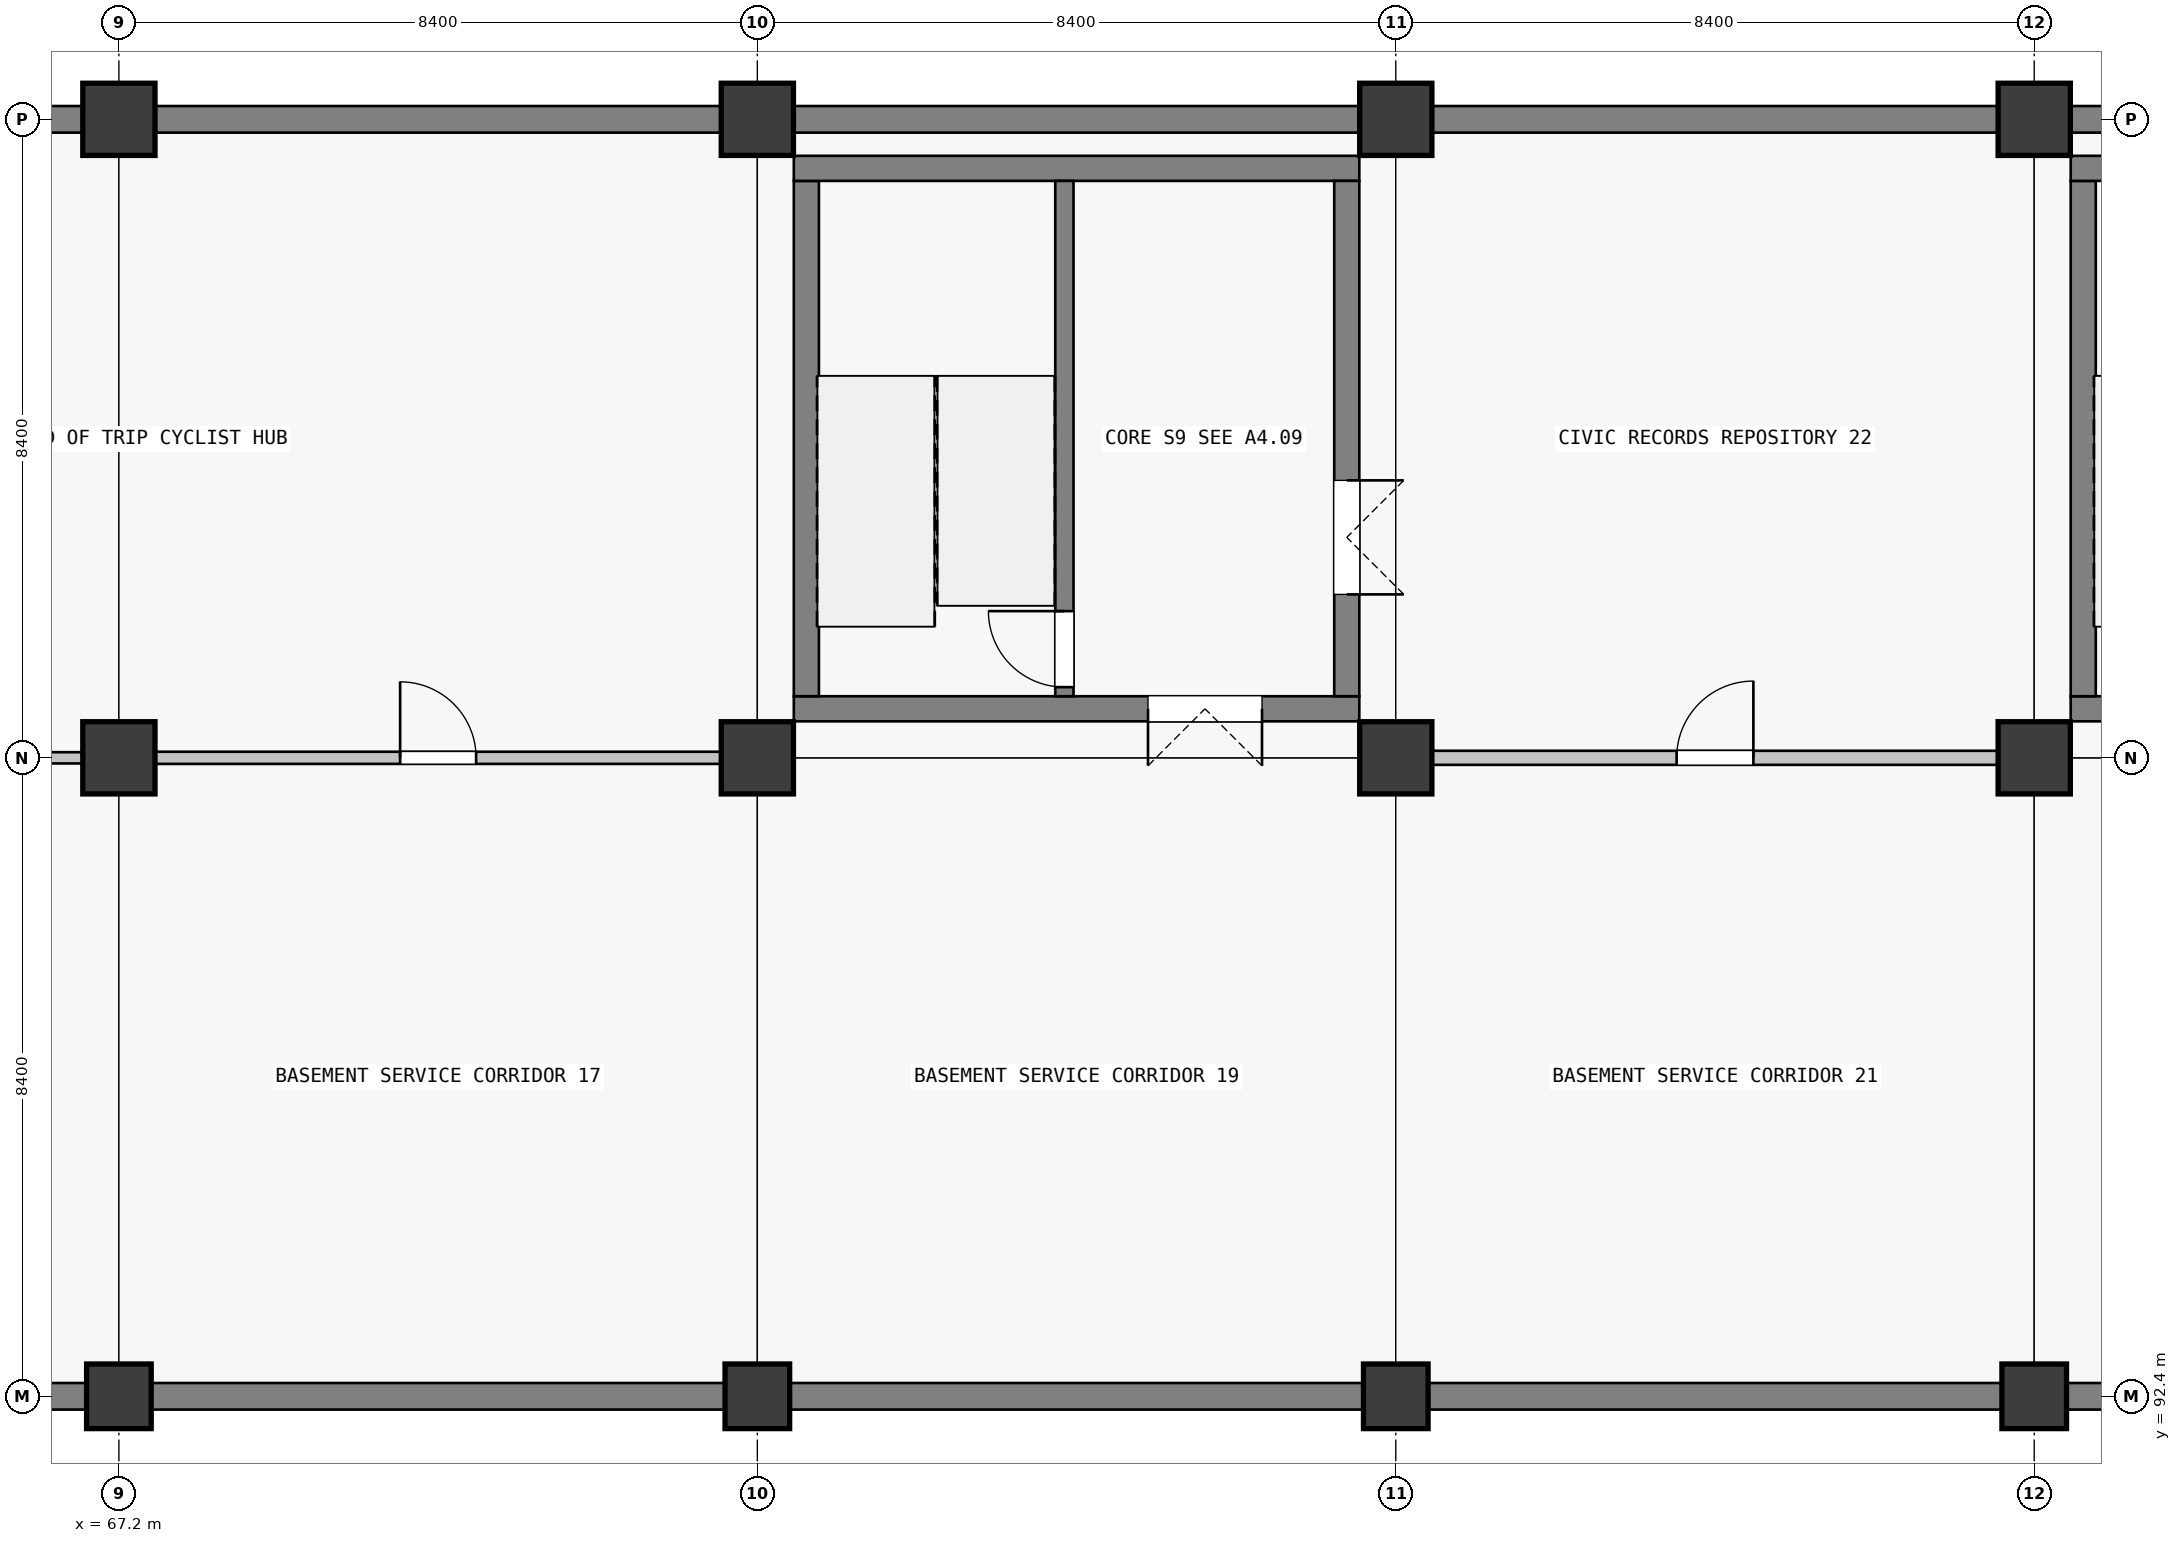
"""IFC4 building model, lengths in metres.
Left out: names, types, materials, properties, quantities, classifications, styles, units other than length and angle.
Written with IfcOpenShell. Run it as: python <this file> out.ifc"""

import sys

from ifc_helpers import new_model, si_unit, direction, frame, frame_2d, origin, origin_2d, place, context, subcontext, project, spatial, rectangle, extrude, element, fill, save


model = new_model("IFC4")
c1 = context("Model", 3, precision=1e-05, world=origin(), true_north=direction((0.0, 1.0)))
c2 = subcontext(c1, "Body", "Model", "MODEL_VIEW")
j1 = project(units=[si_unit("LENGTHUNIT", "METRE"), si_unit("PLANEANGLEUNIT", "RADIAN")], contexts=[c1])
p1 = place(None, origin())
s1 = spatial("IfcSite", under=j1, at=p1, CompositionType="ELEMENT")
p2 = place(p1, origin())
s2 = spatial("IfcBuilding", under=s1, at=p2, CompositionType="ELEMENT")
p3 = place(p2, frame((0.0, 0.0, -4.5)))
s3 = spatial("IfcBuildingStorey", under=s2, at=p3, CompositionType="ELEMENT", Elevation=-4.5)
p4 = place(p3, frame((67.2, 92.4, -0.35), z_axis=(0.0, 0.0, 1.0), x_axis=(1.0, 0.0, 0.0)))
e1 = element("IfcColumn", 1, at=p4, inside=s3, PredefinedType="COLUMN", context=c2, shape_type="SweptSolid", body=[
    extrude(rectangle(XDim=0.85, YDim=0.85, at=origin_2d()), origin(), (0.0, 0.0, 1.0), 4.5),
])
for number, where, z_axis, x_axis in (
    (2, (67.2, 100.8, -0.35), (0.0, 0.0, 1.0), (1.0, 0.0, 0.0)),
    (3, (67.2, 109.2, -0.35), (0.0, 0.0, 1.0), (1.0, 0.0, 0.0)),
):
    element("IfcColumn", number, at=place(p3, frame(where, z_axis=z_axis, x_axis=x_axis)), inside=s3, PredefinedType="COLUMN", context=c2, shape_type="SweptSolid", body=[
        extrude(rectangle(XDim=0.95, YDim=0.95, at=origin_2d()), origin(), (0.0, 0.0, 1.0), 4.85),
    ])
p5 = place(p3, frame((75.6, 92.4, -0.35), z_axis=(0.0, 0.0, 1.0), x_axis=(1.0, 0.0, 0.0)))
e4 = element("IfcColumn", 4, at=p5, inside=s3, PredefinedType="COLUMN", context=c2, shape_type="SweptSolid", body=[
    extrude(rectangle(XDim=0.85, YDim=0.85, at=origin_2d()), origin(), (0.0, 0.0, 1.0), 4.5),
])
for number, where, z_axis, x_axis in (
    (5, (75.6, 100.8, -0.35), (0.0, 0.0, 1.0), (1.0, 0.0, 0.0)),
    (6, (75.6, 109.2, -0.35), (0.0, 0.0, 1.0), (1.0, 0.0, 0.0)),
):
    element("IfcColumn", number, at=place(p3, frame(where, z_axis=z_axis, x_axis=x_axis)), inside=s3, PredefinedType="COLUMN", context=c2, shape_type="SweptSolid", body=[
        extrude(rectangle(XDim=0.95, YDim=0.95, at=origin_2d()), origin(), (0.0, 0.0, 1.0), 4.85),
    ])
p6 = place(p3, frame((84.0, 92.4, -0.35), z_axis=(0.0, 0.0, 1.0), x_axis=(1.0, 0.0, 0.0)))
e7 = element("IfcColumn", 7, at=p6, inside=s3, PredefinedType="COLUMN", context=c2, shape_type="SweptSolid", body=[
    extrude(rectangle(XDim=0.85, YDim=0.85, at=origin_2d()), origin(), (0.0, 0.0, 1.0), 4.5),
])
for number, where, z_axis, x_axis in (
    (8, (84.0, 100.8, -0.35), (0.0, 0.0, 1.0), (1.0, 0.0, 0.0)),
    (9, (84.0, 109.2, -0.35), (0.0, 0.0, 1.0), (1.0, 0.0, 0.0)),
):
    element("IfcColumn", number, at=place(p3, frame(where, z_axis=z_axis, x_axis=x_axis)), inside=s3, PredefinedType="COLUMN", context=c2, shape_type="SweptSolid", body=[
        extrude(rectangle(XDim=0.95, YDim=0.95, at=origin_2d()), origin(), (0.0, 0.0, 1.0), 4.85),
    ])
p7 = place(p3, frame((92.4, 92.4, -0.35), z_axis=(0.0, 0.0, 1.0), x_axis=(1.0, 0.0, 0.0)))
e10 = element("IfcColumn", 10, at=p7, inside=s3, PredefinedType="COLUMN", context=c2, shape_type="SweptSolid", body=[
    extrude(rectangle(XDim=0.85, YDim=0.85, at=origin_2d()), origin(), (0.0, 0.0, 1.0), 4.5),
])
for number, where, z_axis, x_axis in (
    (11, (92.4, 100.8, -0.35), (0.0, 0.0, 1.0), (1.0, 0.0, 0.0)),
    (12, (92.4, 109.2, -0.35), (0.0, 0.0, 1.0), (1.0, 0.0, 0.0)),
):
    element("IfcColumn", number, at=place(p3, frame(where, z_axis=z_axis, x_axis=x_axis)), inside=s3, PredefinedType="COLUMN", context=c2, shape_type="SweptSolid", body=[
        extrude(rectangle(XDim=0.95, YDim=0.95, at=origin_2d()), origin(), (0.0, 0.0, 1.0), 4.85),
    ])
p8 = place(p3, frame((66.774, 92.4, 0.0), z_axis=(0.0, 0.0, 1.0), x_axis=(-1.0, 0.0, 0.0)))
e13 = element("IfcWall", 13, at=p8, inside=s3, PredefinedType="SOLIDWALL", context=c2, shape_type="SweptSolid", body=[
    extrude(rectangle(XDim=7.498, YDim=0.35, at=frame_2d((3.749, 0.0))), origin(), (0.0, 0.0, 1.0), 3.35),
])
p9 = place(p3, frame((59.276, 109.2, 0.0), z_axis=(0.0, 0.0, 1.0), x_axis=(1.0, 0.0, 0.0)))
e14 = element("IfcWall", 14, at=p9, inside=s3, PredefinedType="SOLIDWALL", context=c2, shape_type="SweptSolid", body=[
    extrude(rectangle(XDim=7.448, YDim=0.35, at=frame_2d((3.724, 0.0))), origin(), (0.0, 0.0, 1.0), 3.35),
])
p10 = place(p3, frame((75.174, 92.4, 0.0), z_axis=(0.0, 0.0, 1.0), x_axis=(-1.0, 0.0, 0.0)))
e15 = element("IfcWall", 15, at=p10, inside=s3, PredefinedType="SOLIDWALL", context=c2, shape_type="SweptSolid", body=[
    extrude(rectangle(XDim=7.548, YDim=0.35, at=frame_2d((3.774, 0.0))), origin(), (0.0, 0.0, 1.0), 3.35),
])
p11 = place(p3, frame((67.676, 109.2, 0.0), z_axis=(0.0, 0.0, 1.0), x_axis=(1.0, 0.0, 0.0)))
e16 = element("IfcWall", 16, at=p11, inside=s3, PredefinedType="SOLIDWALL", context=c2, shape_type="SweptSolid", body=[
    extrude(rectangle(XDim=7.448, YDim=0.35, at=frame_2d((3.724, 0.0))), origin(), (0.0, 0.0, 1.0), 3.35),
])
p12 = place(p3, frame((83.574, 92.4, 0.0), z_axis=(0.0, 0.0, 1.0), x_axis=(-1.0, 0.0, 0.0)))
e17 = element("IfcWall", 17, at=p12, inside=s3, PredefinedType="SOLIDWALL", context=c2, shape_type="SweptSolid", body=[
    extrude(rectangle(XDim=7.548, YDim=0.35, at=frame_2d((3.774, 0.0))), origin(), (0.0, 0.0, 1.0), 3.35),
])
p13 = place(p3, frame((76.076, 109.2, 0.0), z_axis=(0.0, 0.0, 1.0), x_axis=(1.0, 0.0, 0.0)))
e18 = element("IfcWall", 18, at=p13, inside=s3, PredefinedType="SOLIDWALL", context=c2, shape_type="SweptSolid", body=[
    extrude(rectangle(XDim=7.448, YDim=0.35, at=frame_2d((3.724, 0.0))), origin(), (0.0, 0.0, 1.0), 3.35),
])
p14 = place(p3, frame((91.974, 92.4, 0.0), z_axis=(0.0, 0.0, 1.0), x_axis=(-1.0, 0.0, 0.0)))
e19 = element("IfcWall", 19, at=p14, inside=s3, PredefinedType="SOLIDWALL", context=c2, shape_type="SweptSolid", body=[
    extrude(rectangle(XDim=7.548, YDim=0.35, at=frame_2d((3.774, 0.0))), origin(), (0.0, 0.0, 1.0), 3.35),
])
p15 = place(p3, frame((84.476, 109.2, 0.0), z_axis=(0.0, 0.0, 1.0), x_axis=(1.0, 0.0, 0.0)))
e20 = element("IfcWall", 20, at=p15, inside=s3, PredefinedType="SOLIDWALL", context=c2, shape_type="SweptSolid", body=[
    extrude(rectangle(XDim=7.448, YDim=0.35, at=frame_2d((3.724, 0.0))), origin(), (0.0, 0.0, 1.0), 3.35),
])
p16 = place(p3, frame((100.374, 92.4, 0.0), z_axis=(0.0, 0.0, 1.0), x_axis=(-1.0, 0.0, 0.0)))
e21 = element("IfcWall", 21, at=p16, inside=s3, PredefinedType="SOLIDWALL", context=c2, shape_type="SweptSolid", body=[
    extrude(rectangle(XDim=7.548, YDim=0.35, at=frame_2d((3.774, 0.0))), origin(), (0.0, 0.0, 1.0), 3.35),
])
p17 = place(p3, frame((92.876, 109.2, 0.0), z_axis=(0.0, 0.0, 1.0), x_axis=(1.0, 0.0, 0.0)))
e22 = element("IfcWall", 22, at=p17, inside=s3, PredefinedType="SOLIDWALL", context=c2, shape_type="SweptSolid", body=[
    extrude(rectangle(XDim=7.448, YDim=0.35, at=frame_2d((3.724, 0.0))), origin(), (0.0, 0.0, 1.0), 3.35),
])
p18 = place(p3, frame((83.52, 101.445, -0.35), z_axis=(0.0, 0.0, 1.0), x_axis=(-1.0, 0.0, 0.0)))
e23 = element("IfcWall", 23, at=p18, inside=s3, PredefinedType="SHEAR", context=c2, shape_type="SweptSolid", body=[
    extrude(rectangle(XDim=7.44, YDim=0.33, at=frame_2d((3.72, 0.0))), origin(), (0.0, 0.0, 1.0), 4.85),
])
p19 = place(p18, frame((1.28, 0.0, 0.35)))
e24 = element("IfcOpeningElement", 24, at=p19, cuts=e23, PredefinedType="OPENING", context=c2, shape_type="SweptSolid", body=[
    extrude(rectangle(XDim=1.5, YDim=2.15, at=frame_2d((0.75, 1.075))), frame((0.0, 0.165, 0.0), z_axis=(0.0, -1.0, 0.0), x_axis=(1.0, 0.0, 0.0)), (0.0, 0.0, 1.0), 0.33),
])
p20 = place(p3, frame((76.245, 101.61, -0.35), z_axis=(0.0, 0.0, 1.0), x_axis=(0.0, 1.0, 0.0)))
e25 = element("IfcWall", 25, at=p20, inside=s3, PredefinedType="SHEAR", context=c2, shape_type="SweptSolid", body=[
    extrude(rectangle(XDim=6.78, YDim=0.33, at=frame_2d((3.39, 0.0))), origin(), (0.0, 0.0, 1.0), 4.85),
])
p21 = place(p3, frame((76.08, 108.555, -0.35), z_axis=(0.0, 0.0, 1.0), x_axis=(1.0, 0.0, 0.0)))
e26 = element("IfcWall", 26, at=p21, inside=s3, PredefinedType="SHEAR", context=c2, shape_type="SweptSolid", body=[
    extrude(rectangle(XDim=7.44, YDim=0.33, at=frame_2d((3.72, 0.0))), origin(), (0.0, 0.0, 1.0), 4.85),
])
p22 = place(p3, frame((83.355, 108.39, -0.35), z_axis=(0.0, 0.0, 1.0), x_axis=(0.0, -1.0, 0.0)))
e27 = element("IfcWall", 27, at=p22, inside=s3, PredefinedType="SHEAR", context=c2, shape_type="SweptSolid", body=[
    extrude(rectangle(XDim=6.78, YDim=0.33, at=frame_2d((3.39, 0.0))), origin(), (0.0, 0.0, 1.0), 4.85),
])
p23 = place(p22, frame((3.94, 0.0, 0.35)))
e28 = element("IfcOpeningElement", 28, at=p23, cuts=e27, PredefinedType="OPENING", context=c2, shape_type="SweptSolid", body=[
    extrude(rectangle(XDim=1.5, YDim=2.15, at=frame_2d((0.75, 1.075))), frame((0.0, 0.165, 0.0), z_axis=(0.0, -1.0, 0.0), x_axis=(1.0, 0.0, 0.0)), (0.0, 0.0, 1.0), 0.33),
])
p24 = place(p3, frame((79.64, 101.61, -0.35), z_axis=(0.0, 0.0, 1.0), x_axis=(0.0, 1.0, 0.0)))
e29 = element("IfcWall", 29, at=p24, inside=s3, PredefinedType="SHEAR", context=c2, shape_type="SweptSolid", body=[
    extrude(rectangle(XDim=6.78, YDim=0.24, at=frame_2d((3.39, 0.0))), origin(), (0.0, 0.0, 1.0), 4.85),
])
p25 = place(p24, frame((0.12, 0.0, 0.35)))
e30 = element("IfcOpeningElement", 30, at=p25, cuts=e29, PredefinedType="OPENING", context=c2, shape_type="SweptSolid", body=[
    extrude(rectangle(XDim=1.0, YDim=2.15, at=frame_2d((0.5, 1.075))), frame((0.0, 0.12, 0.0), z_axis=(0.0, -1.0, 0.0), x_axis=(1.0, 0.0, 0.0)), (0.0, 0.0, 1.0), 0.24),
])
p26 = place(p3, frame((100.32, 101.445, -0.35), z_axis=(0.0, 0.0, 1.0), x_axis=(-1.0, 0.0, 0.0)))
e31 = element("IfcWall", 31, at=p26, inside=s3, PredefinedType="SHEAR", context=c2, shape_type="SweptSolid", body=[
    extrude(rectangle(XDim=7.44, YDim=0.33, at=frame_2d((3.72, 0.0))), origin(), (0.0, 0.0, 1.0), 4.85),
])
p27 = place(p26, frame((1.28, 0.0, 0.35)))
e32 = element("IfcOpeningElement", 32, at=p27, cuts=e31, PredefinedType="OPENING", context=c2, shape_type="SweptSolid", body=[
    extrude(rectangle(XDim=1.5, YDim=2.15, at=frame_2d((0.75, 1.075))), frame((0.0, 0.165, 0.0), z_axis=(0.0, -1.0, 0.0), x_axis=(1.0, 0.0, 0.0)), (0.0, 0.0, 1.0), 0.33),
])
p28 = place(p3, frame((93.045, 101.61, -0.35), z_axis=(0.0, 0.0, 1.0), x_axis=(0.0, 1.0, 0.0)))
e33 = element("IfcWall", 33, at=p28, inside=s3, PredefinedType="SHEAR", context=c2, shape_type="SweptSolid", body=[
    extrude(rectangle(XDim=6.78, YDim=0.33, at=frame_2d((3.39, 0.0))), origin(), (0.0, 0.0, 1.0), 4.85),
])
p29 = place(p3, frame((92.88, 108.555, -0.35), z_axis=(0.0, 0.0, 1.0), x_axis=(1.0, 0.0, 0.0)))
e34 = element("IfcWall", 34, at=p29, inside=s3, PredefinedType="SHEAR", context=c2, shape_type="SweptSolid", body=[
    extrude(rectangle(XDim=7.44, YDim=0.33, at=frame_2d((3.72, 0.0))), origin(), (0.0, 0.0, 1.0), 4.85),
])
p30 = place(p3, frame((59.277, 100.8, 0.0), z_axis=(0.0, 0.0, 1.0), x_axis=(1.0, 0.0, 0.0)))
e35 = element("IfcWall", 35, at=p30, inside=s3, PredefinedType="PARTITIONING", context=c2, shape_type="SweptSolid", body=[
    extrude(rectangle(XDim=7.446, YDim=0.148, at=frame_2d((3.723, 0.0))), origin(), (0.0, 0.0, 1.0), 3.27),
])
p31 = place(p30, frame((3.198, 0.0, 0.0)))
e36 = element("IfcOpeningElement", 36, at=p31, cuts=e35, PredefinedType="OPENING", context=c2, shape_type="SweptSolid", body=[
    extrude(rectangle(XDim=1.05, YDim=2.15, at=frame_2d((0.525, 1.075))), frame((0.0, 0.074, 0.0), z_axis=(0.0, -1.0, 0.0), x_axis=(1.0, 0.0, 0.0)), (0.0, 0.0, 1.0), 0.148),
])
p32 = place(p3, frame((67.677, 100.8, 0.0), z_axis=(0.0, 0.0, 1.0), x_axis=(1.0, 0.0, 0.0)))
e37 = element("IfcWall", 37, at=p32, inside=s3, PredefinedType="PARTITIONING", context=c2, shape_type="SweptSolid", body=[
    extrude(rectangle(XDim=7.446, YDim=0.16, at=frame_2d((3.723, 0.0))), origin(), (0.0, 0.0, 1.0), 3.27),
])
p33 = place(p32, frame((3.223, 0.0, 0.0)))
e38 = element("IfcOpeningElement", 38, at=p33, cuts=e37, PredefinedType="OPENING", context=c2, shape_type="SweptSolid", body=[
    extrude(rectangle(XDim=1.0, YDim=2.15, at=frame_2d((0.5, 1.075))), frame((0.0, 0.08, 0.0), z_axis=(0.0, -1.0, 0.0), x_axis=(1.0, 0.0, 0.0)), (0.0, 0.0, 1.0), 0.16),
])
p34 = place(p3, frame((84.477, 100.8, 0.0), z_axis=(0.0, 0.0, 1.0), x_axis=(1.0, 0.0, 0.0)))
e39 = element("IfcWall", 39, at=p34, inside=s3, PredefinedType="PARTITIONING", context=c2, shape_type="SweptSolid", body=[
    extrude(rectangle(XDim=7.446, YDim=0.185, at=frame_2d((3.723, 0.0))), origin(), (0.0, 0.0, 1.0), 3.27),
])
p35 = place(p34, frame((3.218, 0.0, 0.0)))
e40 = element("IfcOpeningElement", 40, at=p35, cuts=e39, PredefinedType="OPENING", context=c2, shape_type="SweptSolid", body=[
    extrude(rectangle(XDim=1.01, YDim=2.12, at=frame_2d((0.505, 1.06))), frame((0.0, 0.093, 0.0), z_axis=(0.0, -1.0, 0.0), x_axis=(1.0, 0.0, 0.0)), (0.0, 0.0, 1.0), 0.185),
])
p36 = place(p25, origin())
e41 = element("IfcDoor", 41, at=p36, inside=s3, OperationType="SINGLE_SWING_RIGHT", PredefinedType="DOOR", context=c2, shape_type="SweptSolid", body=[
    extrude(rectangle(XDim=1.0, YDim=2.15, at=frame_2d((0.5, 1.075))), frame((0.0, 0.025, 0.0), z_axis=(0.0, -1.0, 0.0), x_axis=(1.0, 0.0, 0.0)), (0.0, 0.0, 1.0), 0.05),
])
fill(e30, e41)
p37 = place(p23, origin())
e42 = element("IfcDoor", 42, at=p37, inside=s3, OperationType="DOUBLE_DOOR_SINGLE_SWING", PredefinedType="DOOR", context=c2, shape_type="SweptSolid", body=[
    extrude(rectangle(XDim=1.5, YDim=2.15, at=frame_2d((0.75, 1.075))), frame((0.0, 0.025, 0.0), z_axis=(0.0, -1.0, 0.0), x_axis=(1.0, 0.0, 0.0)), (0.0, 0.0, 1.0), 0.05),
])
fill(e28, e42)
p38 = place(p19, origin())
e43 = element("IfcDoor", 43, at=p38, inside=s3, OperationType="DOUBLE_DOOR_SINGLE_SWING", PredefinedType="DOOR", context=c2, shape_type="SweptSolid", body=[
    extrude(rectangle(XDim=1.5, YDim=2.15, at=frame_2d((0.75, 1.075))), frame((0.0, 0.025, 0.0), z_axis=(0.0, -1.0, 0.0), x_axis=(1.0, 0.0, 0.0)), (0.0, 0.0, 1.0), 0.05),
])
fill(e24, e43)
p39 = place(p33, origin())
e44 = element("IfcDoor", 44, at=p39, inside=s3, OperationType="SINGLE_SWING_LEFT", PredefinedType="DOOR", context=c2, shape_type="SweptSolid", body=[
    extrude(rectangle(XDim=1.0, YDim=2.15, at=frame_2d((0.5, 1.075))), frame((0.0, 0.025, 0.0), z_axis=(0.0, -1.0, 0.0), x_axis=(1.0, 0.0, 0.0)), (0.0, 0.0, 1.0), 0.05),
])
fill(e38, e44)
p40 = place(p35, origin())
e45 = element("IfcDoor", 45, at=p40, inside=s3, OperationType="SINGLE_SWING_RIGHT", PredefinedType="DOOR", context=c2, shape_type="SweptSolid", body=[
    extrude(rectangle(XDim=1.01, YDim=2.12, at=frame_2d((0.505, 1.06))), frame((0.0, 0.025, 0.0), z_axis=(0.0, -1.0, 0.0), x_axis=(1.0, 0.0, 0.0)), (0.0, 0.0, 1.0), 0.05),
])
fill(e40, e45)
save(model, sys.argv[1])
